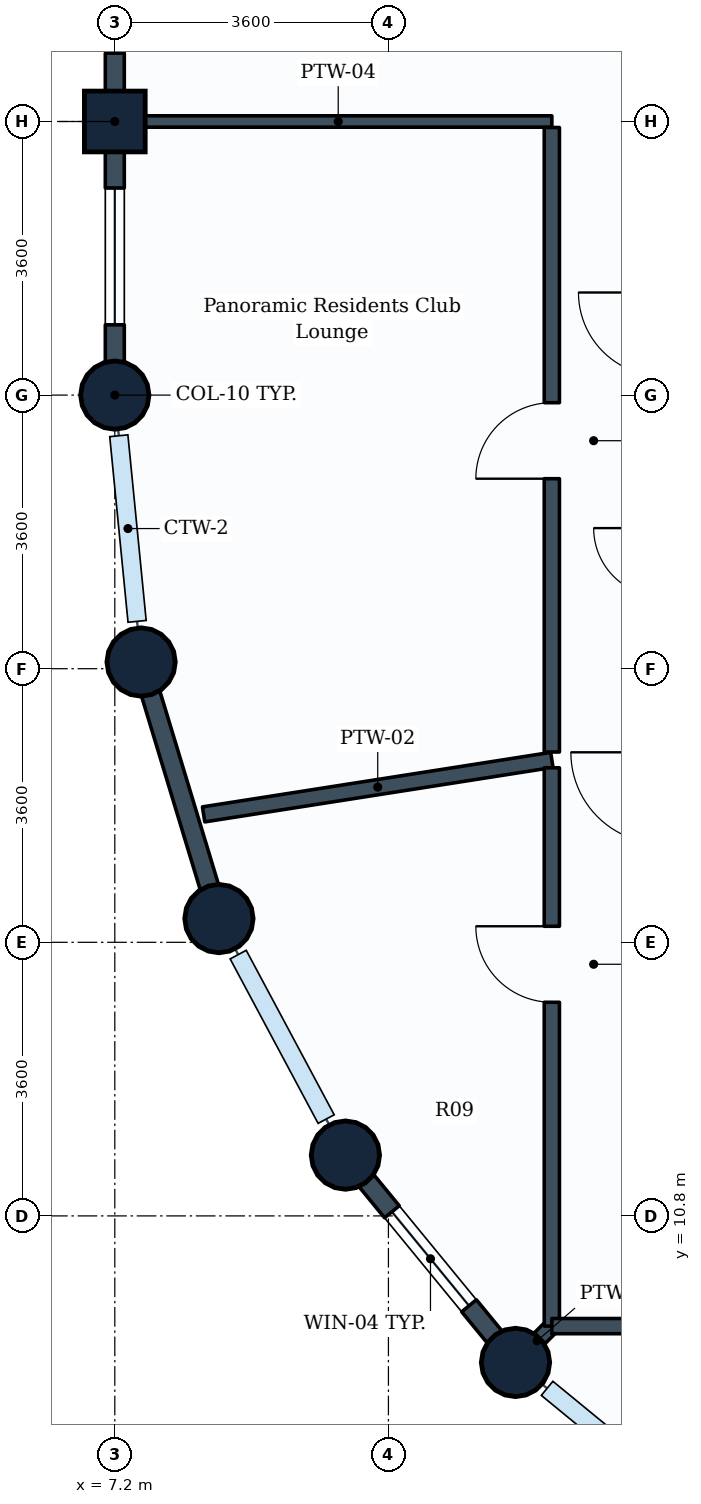
"""IFC4 building model, lengths in metres.
Left out: names, types, materials, properties, quantities, classifications, styles, units other than length and angle.
Written with IfcOpenShell. Run it as: python <this file> out.ifc"""

import sys

from ifc_helpers import new_model, si_unit, direction, frame, frame_2d, origin, origin_2d, place, context, subcontext, project, spatial, rectangle, circle, extrude, element, fill, save


model = new_model("IFC4")
c1 = context("Model", 3, precision=1e-05, world=origin(), true_north=direction((0.0, 1.0)))
c2 = subcontext(c1, "Body", "Model", "MODEL_VIEW")
j1 = project(units=[si_unit("LENGTHUNIT", "METRE"), si_unit("PLANEANGLEUNIT", "RADIAN")], contexts=[c1])
p1 = place(None, origin())
s1 = spatial("IfcSite", under=j1, at=p1, CompositionType="ELEMENT")
p2 = place(p1, origin())
s2 = spatial("IfcBuilding", under=s1, at=p2, CompositionType="ELEMENT")
p3 = place(p2, frame((0.0, 0.0, 228.2)))
s3 = spatial("IfcBuildingStorey", under=s2, at=p3, CompositionType="ELEMENT", Elevation=228.2)
p4 = place(p3, frame((7.2, 21.6, 0.0), z_axis=(0.0, 0.0, 1.0), x_axis=(1.0, 0.0, 0.0)))
e1 = element("IfcColumn", 1, at=p4, inside=s3, PredefinedType="COLUMN", context=c2, shape_type="SweptSolid", body=[
    extrude(circle(Radius=0.45, at=origin_2d()), origin(), (0.0, 0.0, 1.0), 3.6),
])
p5 = place(p3, frame((7.2, 25.2, 0.0), z_axis=(0.0, 0.0, 1.0), x_axis=(0.0, 1.0, 0.0)))
e2 = element("IfcColumn", 2, at=p5, inside=s3, PredefinedType="COLUMN", context=c2, shape_type="SweptSolid", body=[
    extrude(rectangle(XDim=0.8, YDim=0.8, at=origin_2d()), origin(), (0.0, 0.0, 1.0), 3.6),
])
for number, where, z_axis, x_axis in (
    (3, (7.546, 18.088, 0.0), (0.0, 0.0, 1.0), (1.0, 0.0, 0.0)),
    (4, (8.57, 14.712, 0.0), (0.0, 0.0, 1.0), (1.0, 0.0, 0.0)),
    (5, (10.234, 11.6, 0.0), (0.0, 0.0, 1.0), (1.0, 0.0, 0.0)),
    (6, (12.472, 8.872, 0.0), (0.0, 0.0, 1.0), (1.0, 0.0, 0.0)),
):
    element("IfcColumn", number, at=place(p3, frame(where, z_axis=z_axis, x_axis=x_axis)), inside=s3, PredefinedType="COLUMN", context=c2, shape_type="SweptSolid", body=[
        extrude(circle(Radius=0.45, at=origin_2d()), origin(), (0.0, 0.0, 1.0), 3.6),
    ])
p6 = place(p3, frame((7.2, 25.2, 0.0), z_axis=(0.0, 0.0, 1.0), x_axis=(0.0, 1.0, 0.0)))
e7 = element("IfcWall", 7, at=p6, inside=s3, PredefinedType="STANDARD", context=c2, shape_type="SweptSolid", body=[
    extrude(rectangle(XDim=3.6, YDim=0.25, at=frame_2d((1.8, 0.0))), origin(), (0.0, 0.0, 1.0), 2.83),
])
p7 = place(p6, frame((0.9, 0.0, 0.85)))
e8 = element("IfcOpeningElement", 8, at=p7, cuts=e7, PredefinedType="OPENING", context=c2, shape_type="SweptSolid", body=[
    extrude(rectangle(XDim=1.8, YDim=1.35, at=frame_2d((0.9, 0.675))), frame((0.0, 0.135, 0.0), z_axis=(0.0, -1.0, 0.0), x_axis=(1.0, 0.0, 0.0)), (0.0, 0.0, 1.0), 0.27),
])
p8 = place(p3, frame((7.2, 21.6, 0.0), z_axis=(0.0, 0.0, 1.0), x_axis=(0.0, 1.0, 0.0)))
e9 = element("IfcWall", 9, at=p8, inside=s3, PredefinedType="STANDARD", context=c2, shape_type="SweptSolid", body=[
    extrude(rectangle(XDim=3.6, YDim=0.25, at=frame_2d((1.8, 0.0))), origin(), (0.0, 0.0, 1.0), 2.83),
])
p9 = place(p8, frame((0.925, 0.0, 0.85)))
e10 = element("IfcOpeningElement", 10, at=p9, cuts=e9, PredefinedType="OPENING", context=c2, shape_type="SweptSolid", body=[
    extrude(rectangle(XDim=1.8, YDim=1.35, at=frame_2d((0.9, 0.675))), frame((0.0, 0.135, 0.0), z_axis=(0.0, -1.0, 0.0), x_axis=(1.0, 0.0, 0.0)), (0.0, 0.0, 1.0), 0.27),
])
p10 = place(p3, frame((8.57, 14.712, 0.0), z_axis=(0.0, 0.0, 1.0), x_axis=(-0.290305086481, 0.956934144423, 0.0)))
e11 = element("IfcWall", 11, at=p10, inside=s3, PredefinedType="STANDARD", context=c2, shape_type="SweptSolid", body=[
    extrude(rectangle(XDim=3.528, YDim=0.25, at=frame_2d((1.764, 0.0))), origin(), (0.0, 0.0, 1.0), 2.83),
])
p11 = place(p3, frame((12.472, 8.872, 0.0), z_axis=(0.0, 0.0, 1.0), x_axis=(-0.634258295121, 0.773121216285, 0.0)))
e12 = element("IfcWall", 12, at=p11, inside=s3, PredefinedType="STANDARD", context=c2, shape_type="SweptSolid", body=[
    extrude(rectangle(XDim=3.529, YDim=0.25, at=frame_2d((1.764, 0.0))), origin(), (0.0, 0.0, 1.0), 2.83),
])
p12 = place(p11, frame((0.964, 0.0, 0.85)))
e13 = element("IfcOpeningElement", 13, at=p12, cuts=e12, PredefinedType="OPENING", context=c2, shape_type="SweptSolid", body=[
    extrude(rectangle(XDim=1.6, YDim=1.35, at=frame_2d((0.8, 0.675))), frame((0.0, 0.135, 0.0), z_axis=(0.0, -1.0, 0.0), x_axis=(1.0, 0.0, 0.0)), (0.0, 0.0, 1.0), 0.27),
])
p13 = place(p3, frame((7.329, 25.2, 0.0), z_axis=(0.0, 0.0, 1.0), x_axis=(1.0, 0.0, 0.0)))
e14 = element("IfcWall", 14, at=p13, inside=s3, PredefinedType="PARTITIONING", context=c2, shape_type="SweptSolid", body=[
    extrude(rectangle(XDim=5.621, YDim=0.15, at=frame_2d((2.811, 0.0))), origin(), (0.0, 0.0, 1.0), 3.335),
])
p14 = place(p3, frame((12.95, 16.8, 0.0), z_axis=(0.0, 0.0, 1.0), x_axis=(-0.9879733582, -0.154624200844, 0.0)))
e15 = element("IfcWall", 15, at=p14, inside=s3, PredefinedType="PARTITIONING", context=c2, shape_type="SweptSolid", body=[
    extrude(rectangle(XDim=4.637, YDim=0.2, at=frame_2d((2.319, 0.0))), origin(), (0.0, 0.0, 1.0), 2.83),
])
p15 = place(p3, frame((12.95, 9.35, 0.0), z_axis=(0.0, 0.0, 1.0), x_axis=(-0.706883613527, -0.707329878435, 0.0)))
e16 = element("IfcWall", 16, at=p15, inside=s3, PredefinedType="PARTITIONING", context=c2, shape_type="SweptSolid", body=[
    extrude(rectangle(XDim=0.547, YDim=0.2, at=frame_2d((0.273, 0.0))), origin(), (0.0, 0.0, 1.0), 3.02),
])
p16 = place(p3, frame((12.95, 16.904, 0.0), z_axis=(0.0, 0.0, 1.0), x_axis=(0.0, 1.0, 0.0)))
e17 = element("IfcWall", 17, at=p16, inside=s3, PredefinedType="PARTITIONING", context=c2, shape_type="SweptSolid", body=[
    extrude(rectangle(XDim=8.217, YDim=0.2, at=frame_2d((4.108, 0.0))), origin(), (0.0, 0.0, 1.0), 3.02),
])
p17 = place(p16, frame((3.596, 0.0, 0.0)))
e18 = element("IfcOpeningElement", 18, at=p17, cuts=e17, PredefinedType="OPENING", context=c2, shape_type="SweptSolid", body=[
    extrude(rectangle(XDim=1.0, YDim=2.1, at=frame_2d((0.5, 1.05))), frame((0.0, 0.11, 0.0), z_axis=(0.0, -1.0, 0.0), x_axis=(1.0, 0.0, 0.0)), (0.0, 0.0, 1.0), 0.22),
])
p18 = place(p3, frame((12.95, 9.35, 0.0), z_axis=(0.0, 0.0, 1.0), x_axis=(0.0, 1.0, 0.0)))
e19 = element("IfcWall", 19, at=p18, inside=s3, PredefinedType="PARTITIONING", context=c2, shape_type="SweptSolid", body=[
    extrude(rectangle(XDim=7.346, YDim=0.2, at=frame_2d((3.673, 0.0))), origin(), (0.0, 0.0, 1.0), 3.02),
])
p19 = place(p18, frame((4.261, 0.0, 0.0)))
e20 = element("IfcOpeningElement", 20, at=p19, cuts=e19, PredefinedType="OPENING", context=c2, shape_type="SweptSolid", body=[
    extrude(rectangle(XDim=1.0, YDim=2.1, at=frame_2d((0.5, 1.05))), frame((0.0, 0.11, 0.0), z_axis=(0.0, -1.0, 0.0), x_axis=(1.0, 0.0, 0.0)), (0.0, 0.0, 1.0), 0.22),
])
p20 = place(p3, frame((12.95, 9.35, 0.0), z_axis=(0.0, 0.0, 1.0), x_axis=(1.0, 0.0, 0.0)))
e21 = element("IfcWall", 21, at=p20, inside=s3, PredefinedType="PARTITIONING", context=c2, shape_type="SweptSolid", body=[
    extrude(rectangle(XDim=7.346, YDim=0.2, at=frame_2d((3.673, 0.0))), origin(), (0.0, 0.0, 1.0), 3.02),
])
p21 = place(p20, frame((4.261, 0.0, 0.0)))
e22 = element("IfcOpeningElement", 22, at=p21, cuts=e21, PredefinedType="OPENING", context=c2, shape_type="SweptSolid", body=[
    extrude(rectangle(XDim=1.0, YDim=2.1, at=frame_2d((0.5, 1.05))), frame((0.0, 0.11, 0.0), z_axis=(0.0, -1.0, 0.0), x_axis=(1.0, 0.0, 0.0)), (0.0, 0.0, 1.0), 0.22),
])
p22 = place(p7, origin())
e23 = element("IfcWindow", 23, at=p22, inside=s3, PartitioningType="SINGLE_PANEL", PredefinedType="WINDOW", context=c2, shape_type="SweptSolid", body=[
    extrude(rectangle(XDim=1.8, YDim=1.35, at=frame_2d((0.9, 0.675))), frame((0.0, 0.03, 0.0), z_axis=(0.0, -1.0, 0.0), x_axis=(1.0, 0.0, 0.0)), (0.0, 0.0, 1.0), 0.06),
])
fill(e8, e23)
p23 = place(p9, origin())
e24 = element("IfcWindow", 24, at=p23, inside=s3, PartitioningType="SINGLE_PANEL", PredefinedType="WINDOW", context=c2, shape_type="SweptSolid", body=[
    extrude(rectangle(XDim=1.8, YDim=1.35, at=frame_2d((0.9, 0.675))), frame((0.0, 0.03, 0.0), z_axis=(0.0, -1.0, 0.0), x_axis=(1.0, 0.0, 0.0)), (0.0, 0.0, 1.0), 0.06),
])
fill(e10, e24)
p24 = place(p12, origin())
e25 = element("IfcWindow", 25, at=p24, inside=s3, PartitioningType="SINGLE_PANEL", PredefinedType="WINDOW", context=c2, shape_type="SweptSolid", body=[
    extrude(rectangle(XDim=1.6, YDim=1.35, at=frame_2d((0.8, 0.675))), frame((0.0, 0.03, 0.0), z_axis=(0.0, -1.0, 0.0), x_axis=(1.0, 0.0, 0.0)), (0.0, 0.0, 1.0), 0.06),
])
fill(e13, e25)
p25 = place(p17, origin())
e26 = element("IfcDoor", 26, at=p25, inside=s3, OperationType="SINGLE_SWING_LEFT", PredefinedType="DOOR", context=c2, shape_type="SweptSolid", body=[
    extrude(rectangle(XDim=1.0, YDim=2.1, at=frame_2d((0.5, 1.05))), frame((0.0, 0.025, 0.0), z_axis=(0.0, -1.0, 0.0), x_axis=(1.0, 0.0, 0.0)), (0.0, 0.0, 1.0), 0.05),
])
fill(e18, e26)
p26 = place(p19, origin())
e27 = element("IfcDoor", 27, at=p26, inside=s3, OperationType="SINGLE_SWING_RIGHT", PredefinedType="DOOR", context=c2, shape_type="SweptSolid", body=[
    extrude(rectangle(XDim=1.0, YDim=2.1, at=frame_2d((0.5, 1.05))), frame((0.0, 0.025, 0.0), z_axis=(0.0, -1.0, 0.0), x_axis=(1.0, 0.0, 0.0)), (0.0, 0.0, 1.0), 0.05),
])
fill(e20, e27)
save(model, sys.argv[1])
